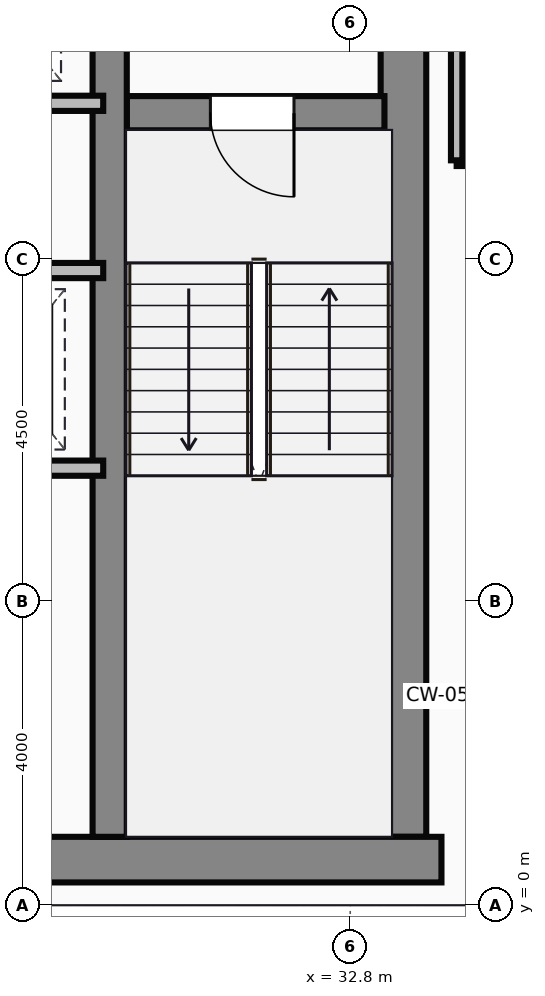
"""IFC4 building model, lengths in metres.
Left out: names, types, materials, properties, quantities, classifications, styles, units other than length and angle.
Written with IfcOpenShell. Run it as: python <this file> out.ifc"""

import sys

from ifc_helpers import new_model, si_unit, direction, frame, frame_2d, origin, place, context, subcontext, project, spatial, rectangle, extrude, source, transform, mapped, element, fill, save


model = new_model("IFC4")
c1 = context("Model", 3, precision=1e-05, world=origin(), true_north=direction((0.0, 1.0)))
c2 = subcontext(c1, "Body", "Model", "MODEL_VIEW")
j1 = project(units=[si_unit("LENGTHUNIT", "METRE"), si_unit("PLANEANGLEUNIT", "RADIAN")], contexts=[c1])
p1 = place(None, origin())
s1 = spatial("IfcSite", under=j1, at=p1, CompositionType="ELEMENT")
p2 = place(p1, origin())
s2 = spatial("IfcBuilding", under=s1, at=p2, CompositionType="ELEMENT")
p3 = place(p2, frame((0.0, 0.0, 284.35)))
s3 = spatial("IfcBuildingStorey", under=s2, at=p3, CompositionType="ELEMENT", Elevation=284.35)
m1 = source(origin(), c2, "Body", "SweptSolid", [
    extrude(rectangle(XDim=29.5, YDim=0.6, at=frame_2d((14.75, 0.0))), origin(), (0.0, 0.0, 1.0), 3.65),
])
p4 = place(p3, frame((4.5, 0.6, 0.0), z_axis=(0.0, 0.0, 1.0), x_axis=(1.0, 0.0, 0.0)))
e1 = element("IfcWall", 1, at=p4, inside=s3, PredefinedType="SHEAR", context=c2, shape_type="MappedRepresentation", body=[
    mapped(m1, transform((0.0, 0.0, 0.0))),
])
m2 = source(origin(), c2, "Body", "SweptSolid", [
    extrude(rectangle(XDim=13.1, YDim=0.6, at=frame_2d((6.55, 0.0))), origin(), (0.0, 0.0, 1.0), 3.65),
])
p5 = place(p3, frame((33.5, 0.9, 0.0), z_axis=(0.0, 0.0, 1.0), x_axis=(0.0, 1.0, 0.0)))
e2 = element("IfcWall", 2, at=p5, inside=s3, PredefinedType="SHEAR", context=c2, shape_type="MappedRepresentation", body=[
    mapped(m2, transform((0.0, 0.0, 0.0))),
])
m3 = source(origin(), c2, "Body", "SweptSolid", [
    extrude(rectangle(XDim=12.5, YDim=0.45, at=frame_2d((6.25, 0.0))), origin(), (0.0, 0.0, 1.0), 3.65),
])
p6 = place(p3, frame((29.635, 0.9, 0.0), z_axis=(0.0, 0.0, 1.0), x_axis=(0.0, 1.0, 0.0)))
e3 = element("IfcWall", 3, at=p6, inside=s3, PredefinedType="SHEAR", context=c2, shape_type="MappedRepresentation", body=[
    mapped(m3, transform((0.0, 0.0, 0.0))),
])
m4 = source(origin(), c2, "Body", "SweptSolid", [
    extrude(rectangle(XDim=3.39, YDim=0.45, at=frame_2d((1.695, 0.0))), origin(), (0.0, 0.0, 1.0), 3.65),
])
p7 = place(p3, frame((29.86, 10.42, 0.0), z_axis=(0.0, 0.0, 1.0), x_axis=(1.0, 0.0, 0.0)))
e4 = element("IfcWall", 4, at=p7, inside=s3, PredefinedType="SHEAR", context=c2, shape_type="MappedRepresentation", body=[
    mapped(m4, transform((0.0, 0.0, 0.0))),
])
p8 = place(p7, frame((1.1, 0.0, 0.0)))
e5 = element("IfcOpeningElement", 5, at=p8, cuts=e4, PredefinedType="OPENING", context=c2, shape_type="SweptSolid", body=[
    extrude(rectangle(XDim=1.1, YDim=2.15, at=frame_2d((0.55, 1.075))), frame((0.0, 0.235, 0.0), z_axis=(0.0, -1.0, 0.0), x_axis=(1.0, 0.0, 0.0)), (0.0, 0.0, 1.0), 0.47),
])
m5 = source(origin(), c2, "Body", "SweptSolid", [
    extrude(rectangle(XDim=8.8, YDim=0.2, at=frame_2d((4.4, 0.0))), origin(), (0.0, 0.0, 1.0), 3.4),
])
p9 = place(p3, frame((20.75, 10.55, 0.0), z_axis=(0.0, 0.0, 1.0), x_axis=(1.0, 0.0, 0.0)))
e6 = element("IfcWall", 6, at=p9, inside=s3, PredefinedType="PARTITIONING", context=c2, shape_type="MappedRepresentation", body=[
    mapped(m5, transform((0.0, 0.0, 0.0))),
])
p10 = place(p9, frame((0.5, 0.0, 0.0)))
e7 = element("IfcOpeningElement", 7, at=p10, cuts=e6, PredefinedType="OPENING", context=c2, shape_type="SweptSolid", body=[
    extrude(rectangle(XDim=1.05, YDim=2.15, at=frame_2d((0.525, 1.075))), frame((0.0, 0.11, 0.0), z_axis=(0.0, -1.0, 0.0), x_axis=(1.0, 0.0, 0.0)), (0.0, 0.0, 1.0), 0.22),
])
p11 = place(p9, frame((2.6, 0.0, 0.0)))
e8 = element("IfcOpeningElement", 8, at=p11, cuts=e6, PredefinedType="OPENING", context=c2, shape_type="SweptSolid", body=[
    extrude(rectangle(XDim=1.05, YDim=2.15, at=frame_2d((0.525, 1.075))), frame((0.0, 0.11, 0.0), z_axis=(0.0, -1.0, 0.0), x_axis=(1.0, 0.0, 0.0)), (0.0, 0.0, 1.0), 0.22),
])
p12 = place(p9, frame((4.7, 0.0, 0.0)))
e9 = element("IfcOpeningElement", 9, at=p12, cuts=e6, PredefinedType="OPENING", context=c2, shape_type="SweptSolid", body=[
    extrude(rectangle(XDim=1.05, YDim=2.15, at=frame_2d((0.525, 1.075))), frame((0.0, 0.11, 0.0), z_axis=(0.0, -1.0, 0.0), x_axis=(1.0, 0.0, 0.0)), (0.0, 0.0, 1.0), 0.22),
])
p13 = place(p9, frame((6.8, 0.0, 0.0)))
e10 = element("IfcOpeningElement", 10, at=p13, cuts=e6, PredefinedType="OPENING", context=c2, shape_type="SweptSolid", body=[
    extrude(rectangle(XDim=1.05, YDim=2.15, at=frame_2d((0.525, 1.075))), frame((0.0, 0.11, 0.0), z_axis=(0.0, -1.0, 0.0), x_axis=(1.0, 0.0, 0.0)), (0.0, 0.0, 1.0), 0.22),
])
m6 = source(origin(), c2, "Body", "SweptSolid", [
    extrude(rectangle(XDim=4.55, YDim=0.2, at=frame_2d((2.275, 0.0))), origin(), (0.0, 0.0, 1.0), 3.4),
])
p14 = place(p3, frame((25.0, 8.35, 0.0), z_axis=(0.0, 0.0, 1.0), x_axis=(1.0, 0.0, 0.0)))
e11 = element("IfcWall", 11, at=p14, inside=s3, PredefinedType="PARTITIONING", context=c2, shape_type="MappedRepresentation", body=[
    mapped(m6, transform((0.0, 0.0, 0.0))),
])
p15 = place(p14, frame((0.5, 0.0, 0.0)))
e12 = element("IfcOpeningElement", 12, at=p15, cuts=e11, PredefinedType="OPENING", context=c2, shape_type="SweptSolid", body=[
    extrude(rectangle(XDim=1.05, YDim=2.15, at=frame_2d((0.525, 1.075))), frame((0.0, 0.11, 0.0), z_axis=(0.0, -1.0, 0.0), x_axis=(1.0, 0.0, 0.0)), (0.0, 0.0, 1.0), 0.22),
])
p16 = place(p14, frame((2.6, 0.0, 0.0)))
e13 = element("IfcOpeningElement", 13, at=p16, cuts=e11, PredefinedType="OPENING", context=c2, shape_type="SweptSolid", body=[
    extrude(rectangle(XDim=1.05, YDim=2.15, at=frame_2d((0.525, 1.075))), frame((0.0, 0.11, 0.0), z_axis=(0.0, -1.0, 0.0), x_axis=(1.0, 0.0, 0.0)), (0.0, 0.0, 1.0), 0.22),
])
p17 = place(p3, frame((25.0, 5.75, 0.0), z_axis=(0.0, 0.0, 1.0), x_axis=(1.0, 0.0, 0.0)))
e14 = element("IfcWall", 14, at=p17, inside=s3, PredefinedType="PARTITIONING", context=c2, shape_type="MappedRepresentation", body=[
    mapped(m6, transform((0.0, 0.0, 0.0))),
])
m7 = source(origin(), c2, "Body", "SweptSolid", [
    extrude(rectangle(XDim=4.8, YDim=0.15, at=frame_2d((2.4, 0.0))), origin(), (0.0, 0.0, 1.0), 3.4),
])
p18 = place(p3, frame((34.2, 9.8, 0.0), z_axis=(0.0, 0.0, 1.0), x_axis=(1.0, 0.0, 0.0)))
e15 = element("IfcWall", 15, at=p18, inside=s3, PredefinedType="PARTITIONING", context=c2, shape_type="MappedRepresentation", body=[
    mapped(m7, transform((0.0, 0.0, 0.0))),
])
m8 = source(origin(), c2, "Body", "SweptSolid", [
    extrude(rectangle(XDim=4.18, YDim=0.15, at=frame_2d((2.09, 0.0))), origin(), (0.0, 0.0, 1.0), 3.4),
])
p19 = place(p3, frame((34.2, 9.8, 0.0), z_axis=(0.0, 0.0, 1.0), x_axis=(0.0, 1.0, 0.0)))
e16 = element("IfcWall", 16, at=p19, inside=s3, PredefinedType="PARTITIONING", context=c2, shape_type="MappedRepresentation", body=[
    mapped(m8, transform((0.0, 0.0, 0.0))),
])
m9 = source(origin(), c2, "Body", "SweptSolid", [
    extrude(rectangle(XDim=1.1, YDim=2.15, at=frame_2d((0.55, 1.075))), frame((0.0, 0.025, 0.0), z_axis=(0.0, -1.0, 0.0), x_axis=(1.0, 0.0, 0.0)), (0.0, 0.0, 1.0), 0.05),
])
p20 = place(p8, frame((1.1, 0.0, 0.0), z_axis=(0.0, 0.0, 1.0), x_axis=(-1.0, 0.0, 0.0)))
e17 = element("IfcDoor", 17, at=p20, inside=s3, OperationType="SINGLE_SWING_RIGHT", PredefinedType="DOOR", context=c2, shape_type="MappedRepresentation", body=[
    mapped(m9, transform((0.0, 0.0, 0.0))),
])
fill(e5, e17)
save(model, sys.argv[1])
